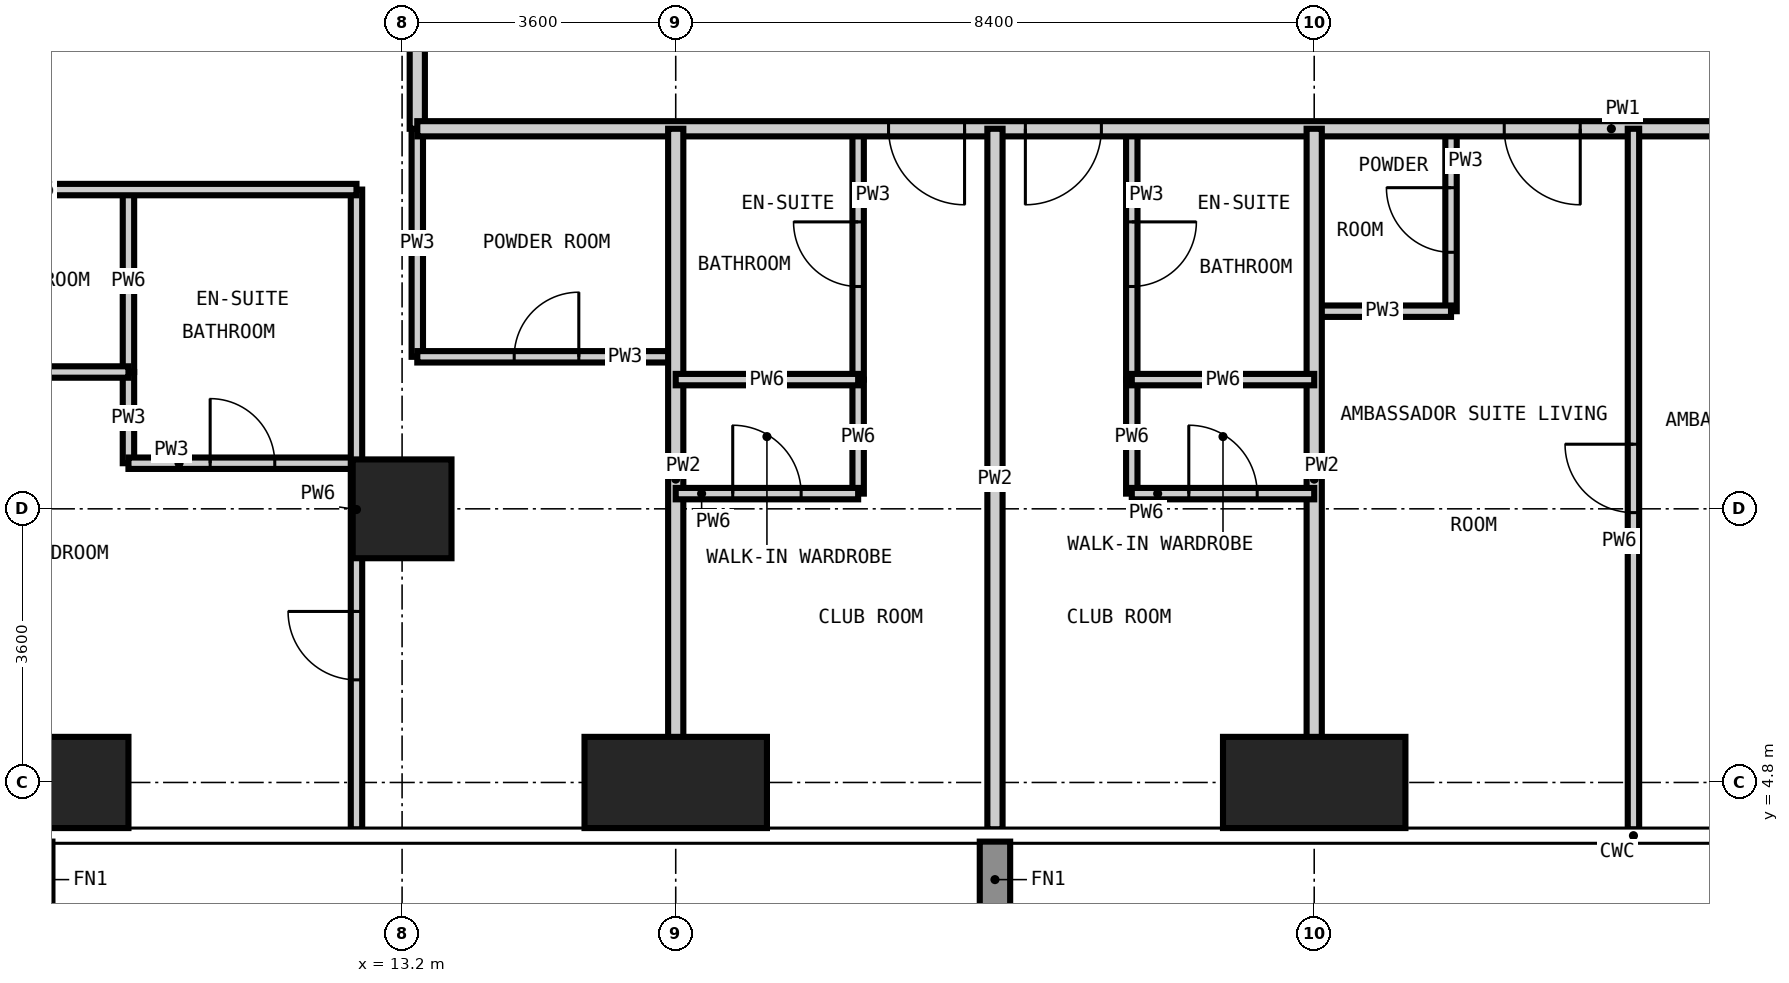
"""IFC4 building model, lengths in metres.
Left out: names, types, materials, properties, quantities, classifications, styles, units other than length and angle.
Written with IfcOpenShell. Run it as: python <this file> out.ifc"""

import sys

from ifc_helpers import new_model, si_unit, direction, frame, frame_2d, origin, origin_2d, place, context, subcontext, project, spatial, rectangle, extrude, element, fill, save


model = new_model("IFC4")
c1 = context("Model", 3, precision=1e-05, world=origin(), true_north=direction((0.0, 1.0)))
c2 = subcontext(c1, "Body", "Model", "MODEL_VIEW")
j1 = project(units=[si_unit("LENGTHUNIT", "METRE"), si_unit("PLANEANGLEUNIT", "RADIAN")], contexts=[c1])
p1 = place(None, origin())
s1 = spatial("IfcSite", under=j1, at=p1, CompositionType="ELEMENT")
p2 = place(p1, origin())
s2 = spatial("IfcBuilding", under=s1, at=p2, CompositionType="ELEMENT")
p3 = place(p2, frame((0.0, 0.0, 198.6)))
s3 = spatial("IfcBuildingStorey", under=s2, at=p3, CompositionType="ELEMENT", Elevation=198.6)
p4 = place(p3, frame((8.4, 4.8, -0.35), z_axis=(0.0, 0.0, 1.0), x_axis=(1.0, 0.0, 0.0)))
e1 = element("IfcColumn", 1, at=p4, inside=s3, PredefinedType="COLUMN", context=c2, shape_type="SweptSolid", body=[
    extrude(rectangle(XDim=2.4, YDim=1.2, at=origin_2d()), origin(), (0.0, 0.0, 1.0), 3.6),
])
p5 = place(p3, frame((13.2, 8.4, -0.35), z_axis=(0.0, 0.0, 1.0), x_axis=(1.0, 0.0, 0.0)))
e2 = element("IfcColumn", 2, at=p5, inside=s3, PredefinedType="COLUMN", context=c2, shape_type="SweptSolid", body=[
    extrude(rectangle(XDim=1.3, YDim=1.3, at=origin_2d()), origin(), (0.0, 0.0, 1.0), 3.6),
])
for number, where, z_axis, x_axis in (
    (3, (16.8, 4.8, -0.35), (0.0, 0.0, 1.0), (1.0, 0.0, 0.0)),
    (4, (25.2, 4.8, -0.35), (0.0, 0.0, 1.0), (1.0, 0.0, 0.0)),
):
    element("IfcColumn", number, at=place(p3, frame(where, z_axis=z_axis, x_axis=x_axis)), inside=s3, PredefinedType="COLUMN", context=c2, shape_type="SweptSolid", body=[
        extrude(rectangle(XDim=2.4, YDim=1.2, at=origin_2d()), origin(), (0.0, 0.0, 1.0), 3.6),
    ])
p6 = place(p3, frame((9.6, 9.0, 0.0), z_axis=(0.0, 0.0, 1.0), x_axis=(0.0, 1.0, 0.0)))
e5 = element("IfcWall", 5, at=p6, inside=s3, PredefinedType="PARTITIONING", context=c2, shape_type="SweptSolid", body=[
    extrude(rectangle(XDim=1.2, YDim=0.15, at=frame_2d((0.6, 0.0))), origin(), (0.0, 0.0, 1.0), 3.25),
])
p7 = place(p3, frame((13.4, 10.4, 0.0), z_axis=(0.0, 0.0, 1.0), x_axis=(0.0, 1.0, 0.0)))
e6 = element("IfcWall", 6, at=p7, inside=s3, PredefinedType="PARTITIONING", context=c2, shape_type="SweptSolid", body=[
    extrude(rectangle(XDim=3.0, YDim=0.15, at=frame_2d((1.5, 0.0))), origin(), (0.0, 0.0, 1.0), 3.25),
])
p8 = place(p3, frame((19.2, 10.1, 0.0), z_axis=(0.0, 0.0, 1.0), x_axis=(0.0, 1.0, 0.0)))
e7 = element("IfcWall", 7, at=p8, inside=s3, PredefinedType="PARTITIONING", context=c2, shape_type="SweptSolid", body=[
    extrude(rectangle(XDim=3.3, YDim=0.15, at=frame_2d((1.65, 0.0))), origin(), (0.0, 0.0, 1.0), 3.25),
])
p9 = place(p8, frame((1.225, 0.0, 0.0)))
e8 = element("IfcOpeningElement", 8, at=p9, cuts=e7, PredefinedType="OPENING", context=c2, shape_type="SweptSolid", body=[
    extrude(rectangle(XDim=0.85, YDim=2.1, at=frame_2d((0.425, 1.05))), frame((0.0, 0.085, 0.0), z_axis=(0.0, -1.0, 0.0), x_axis=(1.0, 0.0, 0.0)), (0.0, 0.0, 1.0), 0.17),
])
p10 = place(p3, frame((22.8, 10.1, 0.0), z_axis=(0.0, 0.0, 1.0), x_axis=(0.0, 1.0, 0.0)))
e9 = element("IfcWall", 9, at=p10, inside=s3, PredefinedType="PARTITIONING", context=c2, shape_type="SweptSolid", body=[
    extrude(rectangle(XDim=3.3, YDim=0.15, at=frame_2d((1.65, 0.0))), origin(), (0.0, 0.0, 1.0), 3.25),
])
p11 = place(p10, frame((1.225, 0.0, 0.0)))
e10 = element("IfcOpeningElement", 10, at=p11, cuts=e9, PredefinedType="OPENING", context=c2, shape_type="SweptSolid", body=[
    extrude(rectangle(XDim=0.85, YDim=2.1, at=frame_2d((0.425, 1.05))), frame((0.0, 0.085, 0.0), z_axis=(0.0, -1.0, 0.0), x_axis=(1.0, 0.0, 0.0)), (0.0, 0.0, 1.0), 0.17),
])
p12 = place(p3, frame((27.0, 11.0, 0.0), z_axis=(0.0, 0.0, 1.0), x_axis=(0.0, 1.0, 0.0)))
e11 = element("IfcWall", 11, at=p12, inside=s3, PredefinedType="PARTITIONING", context=c2, shape_type="SweptSolid", body=[
    extrude(rectangle(XDim=2.4, YDim=0.15, at=frame_2d((1.2, 0.0))), origin(), (0.0, 0.0, 1.0), 3.25),
])
p13 = place(p12, frame((0.775, 0.0, 0.0)))
e12 = element("IfcOpeningElement", 12, at=p13, cuts=e11, PredefinedType="OPENING", context=c2, shape_type="SweptSolid", body=[
    extrude(rectangle(XDim=0.85, YDim=2.1, at=frame_2d((0.425, 1.05))), frame((0.0, 0.085, 0.0), z_axis=(0.0, -1.0, 0.0), x_axis=(1.0, 0.0, 0.0)), (0.0, 0.0, 1.0), 0.17),
])
p14 = place(p3, frame((9.6, 9.0, 0.0), z_axis=(0.0, 0.0, 1.0), x_axis=(1.0, 0.0, 0.0)))
e13 = element("IfcWall", 13, at=p14, inside=s3, PredefinedType="PARTITIONING", context=c2, shape_type="SweptSolid", body=[
    extrude(rectangle(XDim=3.0, YDim=0.15, at=frame_2d((1.5, 0.0))), origin(), (0.0, 0.0, 1.0), 3.25),
])
p15 = place(p14, frame((1.075, 0.0, 0.0)))
e14 = element("IfcOpeningElement", 14, at=p15, cuts=e13, PredefinedType="OPENING", context=c2, shape_type="SweptSolid", body=[
    extrude(rectangle(XDim=0.85, YDim=2.1, at=frame_2d((0.425, 1.05))), frame((0.0, 0.085, 0.0), z_axis=(0.0, -1.0, 0.0), x_axis=(1.0, 0.0, 0.0)), (0.0, 0.0, 1.0), 0.17),
])
p16 = place(p3, frame((13.4, 10.4, 0.0), z_axis=(0.0, 0.0, 1.0), x_axis=(1.0, 0.0, 0.0)))
e15 = element("IfcWall", 15, at=p16, inside=s3, PredefinedType="PARTITIONING", context=c2, shape_type="SweptSolid", body=[
    extrude(rectangle(XDim=3.4, YDim=0.15, at=frame_2d((1.7, 0.0))), origin(), (0.0, 0.0, 1.0), 3.25),
])
p17 = place(p16, frame((1.275, 0.0, 0.0)))
e16 = element("IfcOpeningElement", 16, at=p17, cuts=e15, PredefinedType="OPENING", context=c2, shape_type="SweptSolid", body=[
    extrude(rectangle(XDim=0.85, YDim=2.1, at=frame_2d((0.425, 1.05))), frame((0.0, 0.085, 0.0), z_axis=(0.0, -1.0, 0.0), x_axis=(1.0, 0.0, 0.0)), (0.0, 0.0, 1.0), 0.17),
])
p18 = place(p3, frame((25.2, 11.0, 0.0), z_axis=(0.0, 0.0, 1.0), x_axis=(1.0, 0.0, 0.0)))
e17 = element("IfcWall", 17, at=p18, inside=s3, PredefinedType="PARTITIONING", context=c2, shape_type="SweptSolid", body=[
    extrude(rectangle(XDim=1.8, YDim=0.15, at=frame_2d((0.9, 0.0))), origin(), (0.0, 0.0, 1.0), 3.25),
])
p19 = place(p3, frame((13.4, 13.4, 0.0), z_axis=(0.0, 0.0, 1.0), x_axis=(0.0, 1.0, 0.0)))
e18 = element("IfcWall", 18, at=p19, inside=s3, PredefinedType="PARTITIONING", context=c2, shape_type="SweptSolid", body=[
    extrude(rectangle(XDim=31.4, YDim=0.2, at=frame_2d((15.7, 0.0))), origin(), (0.0, 0.0, 1.0), 3.25),
])
p20 = place(p19, frame((6.2, 0.0, 0.0)))
e19 = element("IfcOpeningElement", 19, at=p20, cuts=e18, PredefinedType="OPENING", context=c2, shape_type="SweptSolid", body=[
    extrude(rectangle(XDim=1.0, YDim=2.2, at=frame_2d((0.5, 1.1))), frame((0.0, 0.11, 0.0), z_axis=(0.0, -1.0, 0.0), x_axis=(1.0, 0.0, 0.0)), (0.0, 0.0, 1.0), 0.22),
])
p21 = place(p19, frame((14.6, 0.0, 0.0)))
e20 = element("IfcOpeningElement", 20, at=p21, cuts=e18, PredefinedType="OPENING", context=c2, shape_type="SweptSolid", body=[
    extrude(rectangle(XDim=1.0, YDim=2.2, at=frame_2d((0.5, 1.1))), frame((0.0, 0.11, 0.0), z_axis=(0.0, -1.0, 0.0), x_axis=(1.0, 0.0, 0.0)), (0.0, 0.0, 1.0), 0.22),
])
p22 = place(p19, frame((23.0, 0.0, 0.0)))
e21 = element("IfcOpeningElement", 21, at=p22, cuts=e18, PredefinedType="OPENING", context=c2, shape_type="SweptSolid", body=[
    extrude(rectangle(XDim=1.0, YDim=2.2, at=frame_2d((0.5, 1.1))), frame((0.0, 0.11, 0.0), z_axis=(0.0, -1.0, 0.0), x_axis=(1.0, 0.0, 0.0)), (0.0, 0.0, 1.0), 0.22),
])
p23 = place(p19, frame((1.2, 0.0, 0.0)))
e22 = element("IfcOpeningElement", 22, at=p23, cuts=e18, PredefinedType="OPENING", context=c2, shape_type="SweptSolid", body=[
    extrude(rectangle(XDim=1.0, YDim=2.2, at=frame_2d((0.5, 1.1))), frame((0.0, 0.11, 0.0), z_axis=(0.0, -1.0, 0.0), x_axis=(1.0, 0.0, 0.0)), (0.0, 0.0, 1.0), 0.22),
])
p24 = place(p19, frame((29.5, 0.0, 0.0)))
e23 = element("IfcOpeningElement", 23, at=p24, cuts=e18, PredefinedType="OPENING", context=c2, shape_type="SweptSolid", body=[
    extrude(rectangle(XDim=1.0, YDim=2.2, at=frame_2d((0.5, 1.1))), frame((0.0, 0.11, 0.0), z_axis=(0.0, -1.0, 0.0), x_axis=(1.0, 0.0, 0.0)), (0.0, 0.0, 1.0), 0.22),
])
p25 = place(p3, frame((44.2, 13.4, 0.0), z_axis=(0.0, 0.0, 1.0), x_axis=(-1.0, 0.0, 0.0)))
e24 = element("IfcWall", 24, at=p25, inside=s3, PredefinedType="PARTITIONING", context=c2, shape_type="SweptSolid", body=[
    extrude(rectangle(XDim=30.8, YDim=0.2, at=frame_2d((15.4, 0.0))), origin(), (0.0, 0.0, 1.0), 3.25),
])
p26 = place(p25, frame((23.6, 0.0, 0.0)))
e25 = element("IfcOpeningElement", 25, at=p26, cuts=e24, PredefinedType="OPENING", context=c2, shape_type="SweptSolid", body=[
    extrude(rectangle(XDim=1.0, YDim=2.2, at=frame_2d((0.5, 1.1))), frame((0.0, 0.11, 0.0), z_axis=(0.0, -1.0, 0.0), x_axis=(1.0, 0.0, 0.0)), (0.0, 0.0, 1.0), 0.22),
])
p27 = place(p25, frame((21.8, 0.0, 0.0)))
e26 = element("IfcOpeningElement", 26, at=p27, cuts=e24, PredefinedType="OPENING", context=c2, shape_type="SweptSolid", body=[
    extrude(rectangle(XDim=1.0, YDim=2.2, at=frame_2d((0.5, 1.1))), frame((0.0, 0.11, 0.0), z_axis=(0.0, -1.0, 0.0), x_axis=(1.0, 0.0, 0.0)), (0.0, 0.0, 1.0), 0.22),
])
p28 = place(p25, frame((15.5, 0.0, 0.0)))
e27 = element("IfcOpeningElement", 27, at=p28, cuts=e24, PredefinedType="OPENING", context=c2, shape_type="SweptSolid", body=[
    extrude(rectangle(XDim=1.0, YDim=2.2, at=frame_2d((0.5, 1.1))), frame((0.0, 0.11, 0.0), z_axis=(0.0, -1.0, 0.0), x_axis=(1.0, 0.0, 0.0)), (0.0, 0.0, 1.0), 0.22),
])
p29 = place(p25, frame((5.0, 0.0, 0.0)))
e28 = element("IfcOpeningElement", 28, at=p29, cuts=e24, PredefinedType="OPENING", context=c2, shape_type="SweptSolid", body=[
    extrude(rectangle(XDim=1.0, YDim=2.2, at=frame_2d((0.5, 1.1))), frame((0.0, 0.11, 0.0), z_axis=(0.0, -1.0, 0.0), x_axis=(1.0, 0.0, 0.0)), (0.0, 0.0, 1.0), 0.22),
])
for number, where, z_axis, x_axis in (
    (29, (16.8, 4.182, 0.0), (0.0, 0.0, 1.0), (0.0, 1.0, 0.0)),
    (30, (21.0, 4.182, 0.0), (0.0, 0.0, 1.0), (0.0, 1.0, 0.0)),
    (31, (25.2, 4.182, 0.0), (0.0, 0.0, 1.0), (0.0, 1.0, 0.0)),
):
    element("IfcWall", number, at=place(p3, frame(where, z_axis=z_axis, x_axis=x_axis)), inside=s3, PredefinedType="PARTITIONING", context=c2, shape_type="SweptSolid", body=[
        extrude(rectangle(XDim=9.218, YDim=0.2, at=frame_2d((4.609, 0.0))), origin(), (0.0, 0.0, 1.0), 3.25),
    ])
p30 = place(p3, frame((9.6, 10.2, 0.0), z_axis=(0.0, 0.0, 1.0), x_axis=(0.0, 1.0, 0.0)))
e32 = element("IfcWall", 32, at=p30, inside=s3, PredefinedType="PARTITIONING", context=c2, shape_type="SweptSolid", body=[
    extrude(rectangle(XDim=2.4, YDim=0.15, at=frame_2d((1.2, 0.0))), origin(), (0.0, 0.0, 1.0), 3.25),
])
p31 = place(p3, frame((12.6, 4.182, 0.0), z_axis=(0.0, 0.0, 1.0), x_axis=(0.0, 1.0, 0.0)))
e33 = element("IfcWall", 33, at=p31, inside=s3, PredefinedType="PARTITIONING", context=c2, shape_type="SweptSolid", body=[
    extrude(rectangle(XDim=8.418, YDim=0.15, at=frame_2d((4.209, 0.0))), origin(), (0.0, 0.0, 1.0), 3.25),
])
p32 = place(p31, frame((1.968, 0.0, 0.0)))
e34 = element("IfcOpeningElement", 34, at=p32, cuts=e33, PredefinedType="OPENING", context=c2, shape_type="SweptSolid", body=[
    extrude(rectangle(XDim=0.9, YDim=2.1, at=frame_2d((0.45, 1.05))), frame((0.0, 0.085, 0.0), z_axis=(0.0, -1.0, 0.0), x_axis=(1.0, 0.0, 0.0)), (0.0, 0.0, 1.0), 0.17),
])
for number, where, z_axis, x_axis in (
    (35, (19.2, 8.6, 0.0), (0.0, 0.0, 1.0), (0.0, 1.0, 0.0)),
    (36, (22.8, 8.6, 0.0), (0.0, 0.0, 1.0), (0.0, 1.0, 0.0)),
):
    element("IfcWall", number, at=place(p3, frame(where, z_axis=z_axis, x_axis=x_axis)), inside=s3, PredefinedType="PARTITIONING", context=c2, shape_type="SweptSolid", body=[
        extrude(rectangle(XDim=1.5, YDim=0.15, at=frame_2d((0.75, 0.0))), origin(), (0.0, 0.0, 1.0), 3.25),
    ])
p33 = place(p3, frame((29.4, 4.182, 0.0), z_axis=(0.0, 0.0, 1.0), x_axis=(0.0, 1.0, 0.0)))
e37 = element("IfcWall", 37, at=p33, inside=s3, PredefinedType="PARTITIONING", context=c2, shape_type="SweptSolid", body=[
    extrude(rectangle(XDim=9.218, YDim=0.15, at=frame_2d((4.609, 0.0))), origin(), (0.0, 0.0, 1.0), 3.25),
])
p34 = place(p33, frame((4.168, 0.0, 0.0)))
e38 = element("IfcOpeningElement", 38, at=p34, cuts=e37, PredefinedType="OPENING", context=c2, shape_type="SweptSolid", body=[
    extrude(rectangle(XDim=0.9, YDim=2.1, at=frame_2d((0.45, 1.05))), frame((0.0, 0.085, 0.0), z_axis=(0.0, -1.0, 0.0), x_axis=(1.0, 0.0, 0.0)), (0.0, 0.0, 1.0), 0.17),
])
p35 = place(p3, frame((16.8, 8.6, 0.0), z_axis=(0.0, 0.0, 1.0), x_axis=(1.0, 0.0, 0.0)))
e39 = element("IfcWall", 39, at=p35, inside=s3, PredefinedType="PARTITIONING", context=c2, shape_type="SweptSolid", body=[
    extrude(rectangle(XDim=2.4, YDim=0.15, at=frame_2d((1.2, 0.0))), origin(), (0.0, 0.0, 1.0), 3.25),
])
p36 = place(p35, frame((0.75, 0.0, 0.0)))
e40 = element("IfcOpeningElement", 40, at=p36, cuts=e39, PredefinedType="OPENING", context=c2, shape_type="SweptSolid", body=[
    extrude(rectangle(XDim=0.9, YDim=2.1, at=frame_2d((0.45, 1.05))), frame((0.0, 0.085, 0.0), z_axis=(0.0, -1.0, 0.0), x_axis=(1.0, 0.0, 0.0)), (0.0, 0.0, 1.0), 0.17),
])
p37 = place(p3, frame((22.8, 8.6, 0.0), z_axis=(0.0, 0.0, 1.0), x_axis=(1.0, 0.0, 0.0)))
e41 = element("IfcWall", 41, at=p37, inside=s3, PredefinedType="PARTITIONING", context=c2, shape_type="SweptSolid", body=[
    extrude(rectangle(XDim=2.4, YDim=0.15, at=frame_2d((1.2, 0.0))), origin(), (0.0, 0.0, 1.0), 3.25),
])
p38 = place(p37, frame((0.75, 0.0, 0.0)))
e42 = element("IfcOpeningElement", 42, at=p38, cuts=e41, PredefinedType="OPENING", context=c2, shape_type="SweptSolid", body=[
    extrude(rectangle(XDim=0.9, YDim=2.1, at=frame_2d((0.45, 1.05))), frame((0.0, 0.085, 0.0), z_axis=(0.0, -1.0, 0.0), x_axis=(1.0, 0.0, 0.0)), (0.0, 0.0, 1.0), 0.17),
])
for number, where, z_axis, x_axis in (
    (43, (16.8, 10.1, 0.0), (0.0, 0.0, 1.0), (1.0, 0.0, 0.0)),
    (44, (22.8, 10.1, 0.0), (0.0, 0.0, 1.0), (1.0, 0.0, 0.0)),
):
    element("IfcWall", number, at=place(p3, frame(where, z_axis=z_axis, x_axis=x_axis)), inside=s3, PredefinedType="PARTITIONING", context=c2, shape_type="SweptSolid", body=[
        extrude(rectangle(XDim=2.4, YDim=0.15, at=frame_2d((1.2, 0.0))), origin(), (0.0, 0.0, 1.0), 3.25),
    ])
p39 = place(p3, frame((6.6, 10.2, 0.0), z_axis=(0.0, 0.0, 1.0), x_axis=(1.0, 0.0, 0.0)))
e45 = element("IfcWall", 45, at=p39, inside=s3, PredefinedType="PARTITIONING", context=c2, shape_type="SweptSolid", body=[
    extrude(rectangle(XDim=3.0, YDim=0.15, at=frame_2d((1.5, 0.0))), origin(), (0.0, 0.0, 1.0), 3.25),
])
p40 = place(p39, frame((1.05, 0.0, 0.0)))
e46 = element("IfcOpeningElement", 46, at=p40, cuts=e45, PredefinedType="OPENING", context=c2, shape_type="SweptSolid", body=[
    extrude(rectangle(XDim=0.9, YDim=2.1, at=frame_2d((0.45, 1.05))), frame((0.0, 0.085, 0.0), z_axis=(0.0, -1.0, 0.0), x_axis=(1.0, 0.0, 0.0)), (0.0, 0.0, 1.0), 0.17),
])
p41 = place(p3, frame((4.182, 12.6, 0.0), z_axis=(0.0, 0.0, 1.0), x_axis=(1.0, 0.0, 0.0)))
e47 = element("IfcWall", 47, at=p41, inside=s3, PredefinedType="PARTITIONING", context=c2, shape_type="SweptSolid", body=[
    extrude(rectangle(XDim=8.418, YDim=0.15, at=frame_2d((4.209, 0.0))), origin(), (0.0, 0.0, 1.0), 3.25),
])
p42 = place(p26, origin())
e48 = element("IfcDoor", 48, at=p42, inside=s3, OperationType="SINGLE_SWING_LEFT", PredefinedType="DOOR", context=c2, shape_type="SweptSolid", body=[
    extrude(rectangle(XDim=1.0, YDim=2.2, at=frame_2d((0.5, 1.1))), frame((0.0, 0.025, 0.0), z_axis=(0.0, -1.0, 0.0), x_axis=(1.0, 0.0, 0.0)), (0.0, 0.0, 1.0), 0.05),
])
fill(e25, e48)
p43 = place(p9, origin())
e49 = element("IfcDoor", 49, at=p43, inside=s3, OperationType="SINGLE_SWING_RIGHT", PredefinedType="DOOR", context=c2, shape_type="SweptSolid", body=[
    extrude(rectangle(XDim=0.85, YDim=2.1, at=frame_2d((0.425, 1.05))), frame((0.0, 0.025, 0.0), z_axis=(0.0, -1.0, 0.0), x_axis=(1.0, 0.0, 0.0)), (0.0, 0.0, 1.0), 0.05),
])
fill(e8, e49)
p44 = place(p36, origin())
e50 = element("IfcDoor", 50, at=p44, inside=s3, OperationType="SINGLE_SWING_LEFT", PredefinedType="DOOR", context=c2, shape_type="SweptSolid", body=[
    extrude(rectangle(XDim=0.9, YDim=2.1, at=frame_2d((0.45, 1.05))), frame((0.0, 0.025, 0.0), z_axis=(0.0, -1.0, 0.0), x_axis=(1.0, 0.0, 0.0)), (0.0, 0.0, 1.0), 0.05),
])
fill(e40, e50)
p45 = place(p27, origin())
e51 = element("IfcDoor", 51, at=p45, inside=s3, OperationType="SINGLE_SWING_RIGHT", PredefinedType="DOOR", context=c2, shape_type="SweptSolid", body=[
    extrude(rectangle(XDim=1.0, YDim=2.2, at=frame_2d((0.5, 1.1))), frame((0.0, 0.025, 0.0), z_axis=(0.0, -1.0, 0.0), x_axis=(1.0, 0.0, 0.0)), (0.0, 0.0, 1.0), 0.05),
])
fill(e26, e51)
p46 = place(p11, frame((0.85, 0.0, 0.0), z_axis=(0.0, 0.0, 1.0), x_axis=(-1.0, 0.0, 0.0)))
e52 = element("IfcDoor", 52, at=p46, inside=s3, OperationType="SINGLE_SWING_LEFT", PredefinedType="DOOR", context=c2, shape_type="SweptSolid", body=[
    extrude(rectangle(XDim=0.85, YDim=2.1, at=frame_2d((0.425, 1.05))), frame((0.0, 0.025, 0.0), z_axis=(0.0, -1.0, 0.0), x_axis=(1.0, 0.0, 0.0)), (0.0, 0.0, 1.0), 0.05),
])
fill(e10, e52)
p47 = place(p38, origin())
e53 = element("IfcDoor", 53, at=p47, inside=s3, OperationType="SINGLE_SWING_LEFT", PredefinedType="DOOR", context=c2, shape_type="SweptSolid", body=[
    extrude(rectangle(XDim=0.9, YDim=2.1, at=frame_2d((0.45, 1.05))), frame((0.0, 0.025, 0.0), z_axis=(0.0, -1.0, 0.0), x_axis=(1.0, 0.0, 0.0)), (0.0, 0.0, 1.0), 0.05),
])
fill(e42, e53)
p48 = place(p28, origin())
e54 = element("IfcDoor", 54, at=p48, inside=s3, OperationType="SINGLE_SWING_LEFT", PredefinedType="DOOR", context=c2, shape_type="SweptSolid", body=[
    extrude(rectangle(XDim=1.0, YDim=2.2, at=frame_2d((0.5, 1.1))), frame((0.0, 0.025, 0.0), z_axis=(0.0, -1.0, 0.0), x_axis=(1.0, 0.0, 0.0)), (0.0, 0.0, 1.0), 0.05),
])
fill(e27, e54)
p49 = place(p13, origin())
e55 = element("IfcDoor", 55, at=p49, inside=s3, OperationType="SINGLE_SWING_RIGHT", PredefinedType="DOOR", context=c2, shape_type="SweptSolid", body=[
    extrude(rectangle(XDim=0.85, YDim=2.1, at=frame_2d((0.425, 1.05))), frame((0.0, 0.025, 0.0), z_axis=(0.0, -1.0, 0.0), x_axis=(1.0, 0.0, 0.0)), (0.0, 0.0, 1.0), 0.05),
])
fill(e12, e55)
p50 = place(p34, origin())
e56 = element("IfcDoor", 56, at=p50, inside=s3, OperationType="SINGLE_SWING_RIGHT", PredefinedType="DOOR", context=c2, shape_type="SweptSolid", body=[
    extrude(rectangle(XDim=0.9, YDim=2.1, at=frame_2d((0.45, 1.05))), frame((0.0, 0.025, 0.0), z_axis=(0.0, -1.0, 0.0), x_axis=(1.0, 0.0, 0.0)), (0.0, 0.0, 1.0), 0.05),
])
fill(e38, e56)
p51 = place(p17, origin())
e57 = element("IfcDoor", 57, at=p51, inside=s3, OperationType="SINGLE_SWING_RIGHT", PredefinedType="DOOR", context=c2, shape_type="SweptSolid", body=[
    extrude(rectangle(XDim=0.85, YDim=2.1, at=frame_2d((0.425, 1.05))), frame((0.0, 0.025, 0.0), z_axis=(0.0, -1.0, 0.0), x_axis=(1.0, 0.0, 0.0)), (0.0, 0.0, 1.0), 0.05),
])
fill(e16, e57)
p52 = place(p32, origin())
e58 = element("IfcDoor", 58, at=p52, inside=s3, OperationType="SINGLE_SWING_RIGHT", PredefinedType="DOOR", context=c2, shape_type="SweptSolid", body=[
    extrude(rectangle(XDim=0.9, YDim=2.1, at=frame_2d((0.45, 1.05))), frame((0.0, 0.025, 0.0), z_axis=(0.0, -1.0, 0.0), x_axis=(1.0, 0.0, 0.0)), (0.0, 0.0, 1.0), 0.05),
])
fill(e34, e58)
p53 = place(p15, origin())
e59 = element("IfcDoor", 59, at=p53, inside=s3, OperationType="SINGLE_SWING_LEFT", PredefinedType="DOOR", context=c2, shape_type="SweptSolid", body=[
    extrude(rectangle(XDim=0.85, YDim=2.1, at=frame_2d((0.425, 1.05))), frame((0.0, 0.025, 0.0), z_axis=(0.0, -1.0, 0.0), x_axis=(1.0, 0.0, 0.0)), (0.0, 0.0, 1.0), 0.05),
])
fill(e14, e59)
save(model, sys.argv[1])
